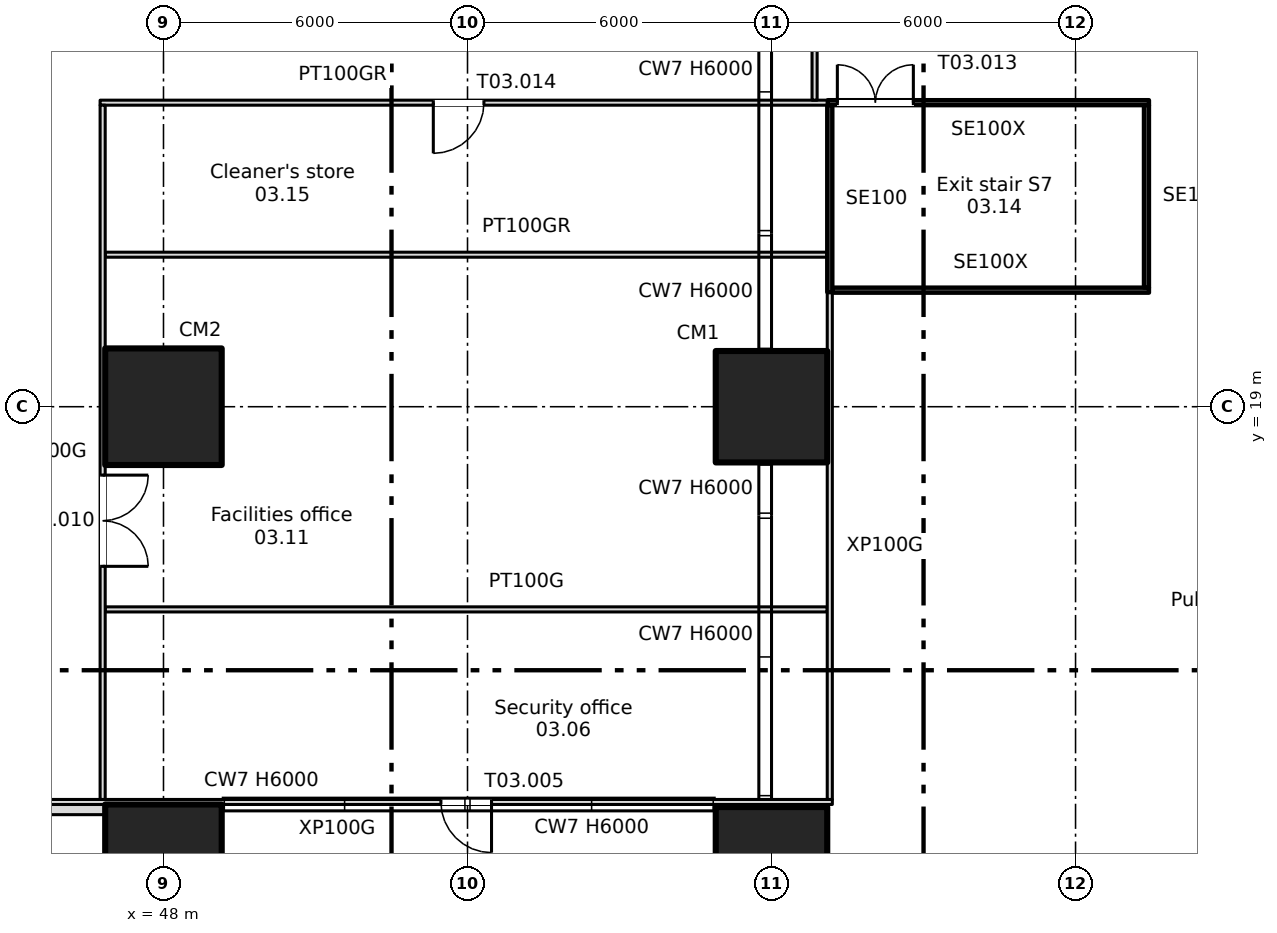
"""IFC4 building model, lengths in metres.
Left out: names, types, materials, properties, quantities, classifications, styles, units other than length and angle.
Written with IfcOpenShell. Run it as: python <this file> out.ifc"""

import sys

from ifc_helpers import new_model, si_unit, direction, frame, frame_2d, origin, origin_2d, place, context, subcontext, project, spatial, rectangle, extrude, element, fill, save


model = new_model("IFC4")
c1 = context("Model", 3, precision=1e-05, world=origin(), true_north=direction((0.0, 1.0)))
c2 = subcontext(c1, "Body", "Model", "MODEL_VIEW")
j1 = project(units=[si_unit("LENGTHUNIT", "METRE"), si_unit("PLANEANGLEUNIT", "RADIAN")], contexts=[c1])
p1 = place(None, origin())
s1 = spatial("IfcSite", under=j1, at=p1, CompositionType="ELEMENT")
p2 = place(p1, origin())
s2 = spatial("IfcBuilding", under=s1, at=p2, CompositionType="ELEMENT")
p3 = place(p2, origin())
s3 = spatial("IfcBuildingStorey", under=s2, at=p3, CompositionType="ELEMENT", Elevation=0.0)
for number, where, z_axis, x_axis in (
    (1, (48.0, 10.0, 0.0), (0.0, 0.0, 1.0), (1.0, 0.0, 0.0)),
    (2, (48.0, 19.0, 0.0), (0.0, 0.0, 1.0), (1.0, 0.0, 0.0)),
):
    element("IfcColumn", number, at=place(p3, frame(where, z_axis=z_axis, x_axis=x_axis)), inside=s3, PredefinedType="COLUMN", context=c2, shape_type="SweptSolid", body=[
        extrude(rectangle(XDim=2.3, YDim=2.3, at=origin_2d()), origin(), (0.0, 0.0, 1.0), 6.0),
    ])
for number, where, z_axis, x_axis in (
    (3, (60.0, 10.0, 0.0), (0.0, 0.0, 1.0), (1.0, 0.0, 0.0)),
    (4, (60.0, 19.0, 0.0), (0.0, 0.0, 1.0), (1.0, 0.0, 0.0)),
):
    element("IfcColumn", number, at=place(p3, frame(where, z_axis=z_axis, x_axis=x_axis)), inside=s3, PredefinedType="COLUMN", context=c2, shape_type="SweptSolid", body=[
        extrude(rectangle(XDim=2.2, YDim=2.2, at=origin_2d()), origin(), (0.0, 0.0, 1.0), 6.0),
    ])
p4 = place(p3, frame((42.0, 11.05, 0.0), z_axis=(0.0, 0.0, 1.0), x_axis=(1.0, 0.0, 0.0)))
e5 = element("IfcWall", 5, at=p4, inside=s3, PredefinedType="SOLIDWALL", context=c2, shape_type="SweptSolid", body=[
    extrude(rectangle(XDim=6.0, YDim=0.2, at=frame_2d((3.0, 0.0))), origin(), (0.0, 0.0, 1.0), 6.0),
])
p5 = place(p4, frame((0.2, 0.0, 0.0)))
e6 = element("IfcOpeningElement", 6, at=p5, cuts=e5, PredefinedType="OPENING", context=c2, shape_type="SweptSolid", body=[
    extrude(rectangle(XDim=2.2, YDim=2.5, at=frame_2d((1.1, 1.25))), frame((0.0, 0.11, 0.0), z_axis=(0.0, -1.0, 0.0), x_axis=(1.0, 0.0, 0.0)), (0.0, 0.0, 1.0), 0.22),
])
p6 = place(p3, frame((44.45, 11.2, 0.0), z_axis=(0.0, 0.0, 1.0), x_axis=(1.0, 0.0, 0.0)))
e7 = element("IfcWall", 7, at=p6, inside=s3, PredefinedType="PARTITIONING", context=c2, shape_type="SweptSolid", body=[
    extrude(rectangle(XDim=16.75, YDim=0.1, at=frame_2d((8.375, 0.0))), origin(), (0.0, 0.0, 1.0), 6.0),
])
p7 = place(p6, frame((9.025, 0.0, 0.0)))
e8 = element("IfcOpeningElement", 8, at=p7, cuts=e7, PredefinedType="OPENING", context=c2, shape_type="SweptSolid", body=[
    extrude(rectangle(XDim=1.0, YDim=2.1, at=frame_2d((0.5, 1.05))), frame((0.0, 0.06, 0.0), z_axis=(0.0, -1.0, 0.0), x_axis=(1.0, 0.0, 0.0)), (0.0, 0.0, 1.0), 0.12),
])
p8 = place(p3, frame((46.85, 15.0, 0.0), z_axis=(0.0, 0.0, 1.0), x_axis=(1.0, 0.0, 0.0)))
e9 = element("IfcWall", 9, at=p8, inside=s3, PredefinedType="PARTITIONING", context=c2, shape_type="SweptSolid", body=[
    extrude(rectangle(XDim=14.25, YDim=0.1, at=frame_2d((7.125, 0.0))), origin(), (0.0, 0.0, 1.0), 6.0),
])
p9 = place(p3, frame((61.2, 21.3, 0.0), z_axis=(0.0, 0.0, 1.0), x_axis=(1.0, 0.0, 0.0)))
e10 = element("IfcWall", 10, at=p9, inside=s3, PredefinedType="SOLIDWALL", context=c2, shape_type="SweptSolid", body=[
    extrude(rectangle(XDim=6.25, YDim=0.1, at=frame_2d((3.125, 0.0))), origin(), (0.0, 0.0, 1.0), 6.0),
])
p10 = place(p3, frame((46.85, 22.0, 0.0), z_axis=(0.0, 0.0, 1.0), x_axis=(1.0, 0.0, 0.0)))
e11 = element("IfcWall", 11, at=p10, inside=s3, PredefinedType="PARTITIONING", context=c2, shape_type="SweptSolid", body=[
    extrude(rectangle(XDim=14.25, YDim=0.1, at=frame_2d((7.125, 0.0))), origin(), (0.0, 0.0, 1.0), 6.0),
])
p11 = place(p3, frame((46.75, 25.0, 0.0), z_axis=(0.0, 0.0, 1.0), x_axis=(1.0, 0.0, 0.0)))
e12 = element("IfcWall", 12, at=p11, inside=s3, PredefinedType="PARTITIONING", context=c2, shape_type="SweptSolid", body=[
    extrude(rectangle(XDim=14.36, YDim=0.1, at=frame_2d((7.18, 0.0))), origin(), (0.0, 0.0, 1.0), 6.0),
])
p12 = place(p11, frame((6.575, 0.0, 0.0)))
e13 = element("IfcOpeningElement", 13, at=p12, cuts=e12, PredefinedType="OPENING", context=c2, shape_type="SweptSolid", body=[
    extrude(rectangle(XDim=1.0, YDim=2.1, at=frame_2d((0.5, 1.05))), frame((0.0, 0.06, 0.0), z_axis=(0.0, -1.0, 0.0), x_axis=(1.0, 0.0, 0.0)), (0.0, 0.0, 1.0), 0.12),
])
p13 = place(p3, frame((61.11, 25.0, 0.0), z_axis=(0.0, 0.0, 1.0), x_axis=(1.0, 0.0, 0.0)))
e14 = element("IfcWall", 14, at=p13, inside=s3, PredefinedType="SOLIDWALL", context=c2, shape_type="SweptSolid", body=[
    extrude(rectangle(XDim=6.34, YDim=0.1, at=frame_2d((3.17, 0.0))), origin(), (0.0, 0.0, 1.0), 6.0),
])
p14 = place(p13, frame((0.19, 0.0, 0.0)))
e15 = element("IfcOpeningElement", 15, at=p14, cuts=e14, PredefinedType="OPENING", context=c2, shape_type="SweptSolid", body=[
    extrude(rectangle(XDim=1.5, YDim=2.1, at=frame_2d((0.75, 1.05))), frame((0.0, 0.06, 0.0), z_axis=(0.0, -1.0, 0.0), x_axis=(1.0, 0.0, 0.0)), (0.0, 0.0, 1.0), 0.12),
])
p15 = place(p3, frame((46.8, 11.25, 0.0), z_axis=(0.0, 0.0, 1.0), x_axis=(0.0, 1.0, 0.0)))
e16 = element("IfcWall", 16, at=p15, inside=s3, PredefinedType="PARTITIONING", context=c2, shape_type="SweptSolid", body=[
    extrude(rectangle(XDim=13.7, YDim=0.1, at=frame_2d((6.85, 0.0))), origin(), (0.0, 0.0, 1.0), 6.0),
])
p16 = place(p15, frame((4.6, 0.0, 0.0)))
e17 = element("IfcOpeningElement", 17, at=p16, cuts=e16, PredefinedType="OPENING", context=c2, shape_type="SweptSolid", body=[
    extrude(rectangle(XDim=1.8, YDim=2.1, at=frame_2d((0.9, 1.05))), frame((0.0, 0.06, 0.0), z_axis=(0.0, -1.0, 0.0), x_axis=(1.0, 0.0, 0.0)), (0.0, 0.0, 1.0), 0.12),
])
p17 = place(p3, frame((60.85, 25.05, 0.0), z_axis=(0.0, 0.0, 1.0), x_axis=(0.0, 1.0, 0.0)))
e18 = element("IfcWall", 18, at=p17, inside=s3, PredefinedType="PARTITIONING", context=c2, shape_type="SweptSolid", body=[
    extrude(rectangle(XDim=2.95, YDim=0.1, at=frame_2d((1.475, 0.0))), origin(), (0.0, 0.0, 1.0), 6.0),
])
p18 = place(p3, frame((61.15, 11.25, 0.0), z_axis=(0.0, 0.0, 1.0), x_axis=(0.0, 1.0, 0.0)))
e19 = element("IfcWall", 19, at=p18, inside=s3, PredefinedType="PARTITIONING", context=c2, shape_type="SweptSolid", body=[
    extrude(rectangle(XDim=10.01, YDim=0.1, at=frame_2d((5.005, 0.0))), origin(), (0.0, 0.0, 1.0), 6.0),
])
p19 = place(p3, frame((61.15, 21.26, 0.0), z_axis=(0.0, 0.0, 1.0), x_axis=(0.0, 1.0, 0.0)))
e20 = element("IfcWall", 20, at=p19, inside=s3, PredefinedType="SOLIDWALL", context=c2, shape_type="SweptSolid", body=[
    extrude(rectangle(XDim=3.69, YDim=0.1, at=frame_2d((1.845, 0.0))), origin(), (0.0, 0.0, 1.0), 6.0),
])
p20 = place(p3, frame((67.4, 21.35, 0.0), z_axis=(0.0, 0.0, 1.0), x_axis=(0.0, 1.0, 0.0)))
e21 = element("IfcWall", 21, at=p20, inside=s3, PredefinedType="SOLIDWALL", context=c2, shape_type="SweptSolid", body=[
    extrude(rectangle(XDim=3.6, YDim=0.1, at=frame_2d((1.8, 0.0))), origin(), (0.0, 0.0, 1.0), 6.0),
])
p21 = place(p7, frame((1.0, 0.0, 0.0), z_axis=(0.0, 0.0, 1.0), x_axis=(-1.0, 0.0, 0.0)))
e22 = element("IfcDoor", 22, at=p21, inside=s3, OperationType="SINGLE_SWING_LEFT", PredefinedType="DOOR", context=c2, shape_type="SweptSolid", body=[
    extrude(rectangle(XDim=1.0, YDim=2.1, at=frame_2d((0.5, 1.05))), frame((0.0, 0.025, 0.0), z_axis=(0.0, -1.0, 0.0), x_axis=(1.0, 0.0, 0.0)), (0.0, 0.0, 1.0), 0.05),
])
fill(e8, e22)
p22 = place(p16, origin())
e23 = element("IfcDoor", 23, at=p22, inside=s3, OperationType="DOUBLE_DOOR_SINGLE_SWING", PredefinedType="DOOR", context=c2, shape_type="SweptSolid", body=[
    extrude(rectangle(XDim=1.8, YDim=2.1, at=frame_2d((0.9, 1.05))), frame((0.0, 0.025, 0.0), z_axis=(0.0, -1.0, 0.0), x_axis=(1.0, 0.0, 0.0)), (0.0, 0.0, 1.0), 0.05),
])
fill(e17, e23)
p23 = place(p14, origin())
e24 = element("IfcDoor", 24, at=p23, inside=s3, OperationType="DOUBLE_DOOR_SINGLE_SWING", PredefinedType="DOOR", context=c2, shape_type="SweptSolid", body=[
    extrude(rectangle(XDim=1.5, YDim=2.1, at=frame_2d((0.75, 1.05))), frame((0.0, 0.025, 0.0), z_axis=(0.0, -1.0, 0.0), x_axis=(1.0, 0.0, 0.0)), (0.0, 0.0, 1.0), 0.05),
])
fill(e15, e24)
p24 = place(p12, origin())
e25 = element("IfcDoor", 25, at=p24, inside=s3, OperationType="SINGLE_SWING_LEFT", PredefinedType="DOOR", context=c2, shape_type="SweptSolid", body=[
    extrude(rectangle(XDim=1.0, YDim=2.1, at=frame_2d((0.5, 1.05))), frame((0.0, 0.025, 0.0), z_axis=(0.0, -1.0, 0.0), x_axis=(1.0, 0.0, 0.0)), (0.0, 0.0, 1.0), 0.05),
])
fill(e13, e25)
save(model, sys.argv[1])
